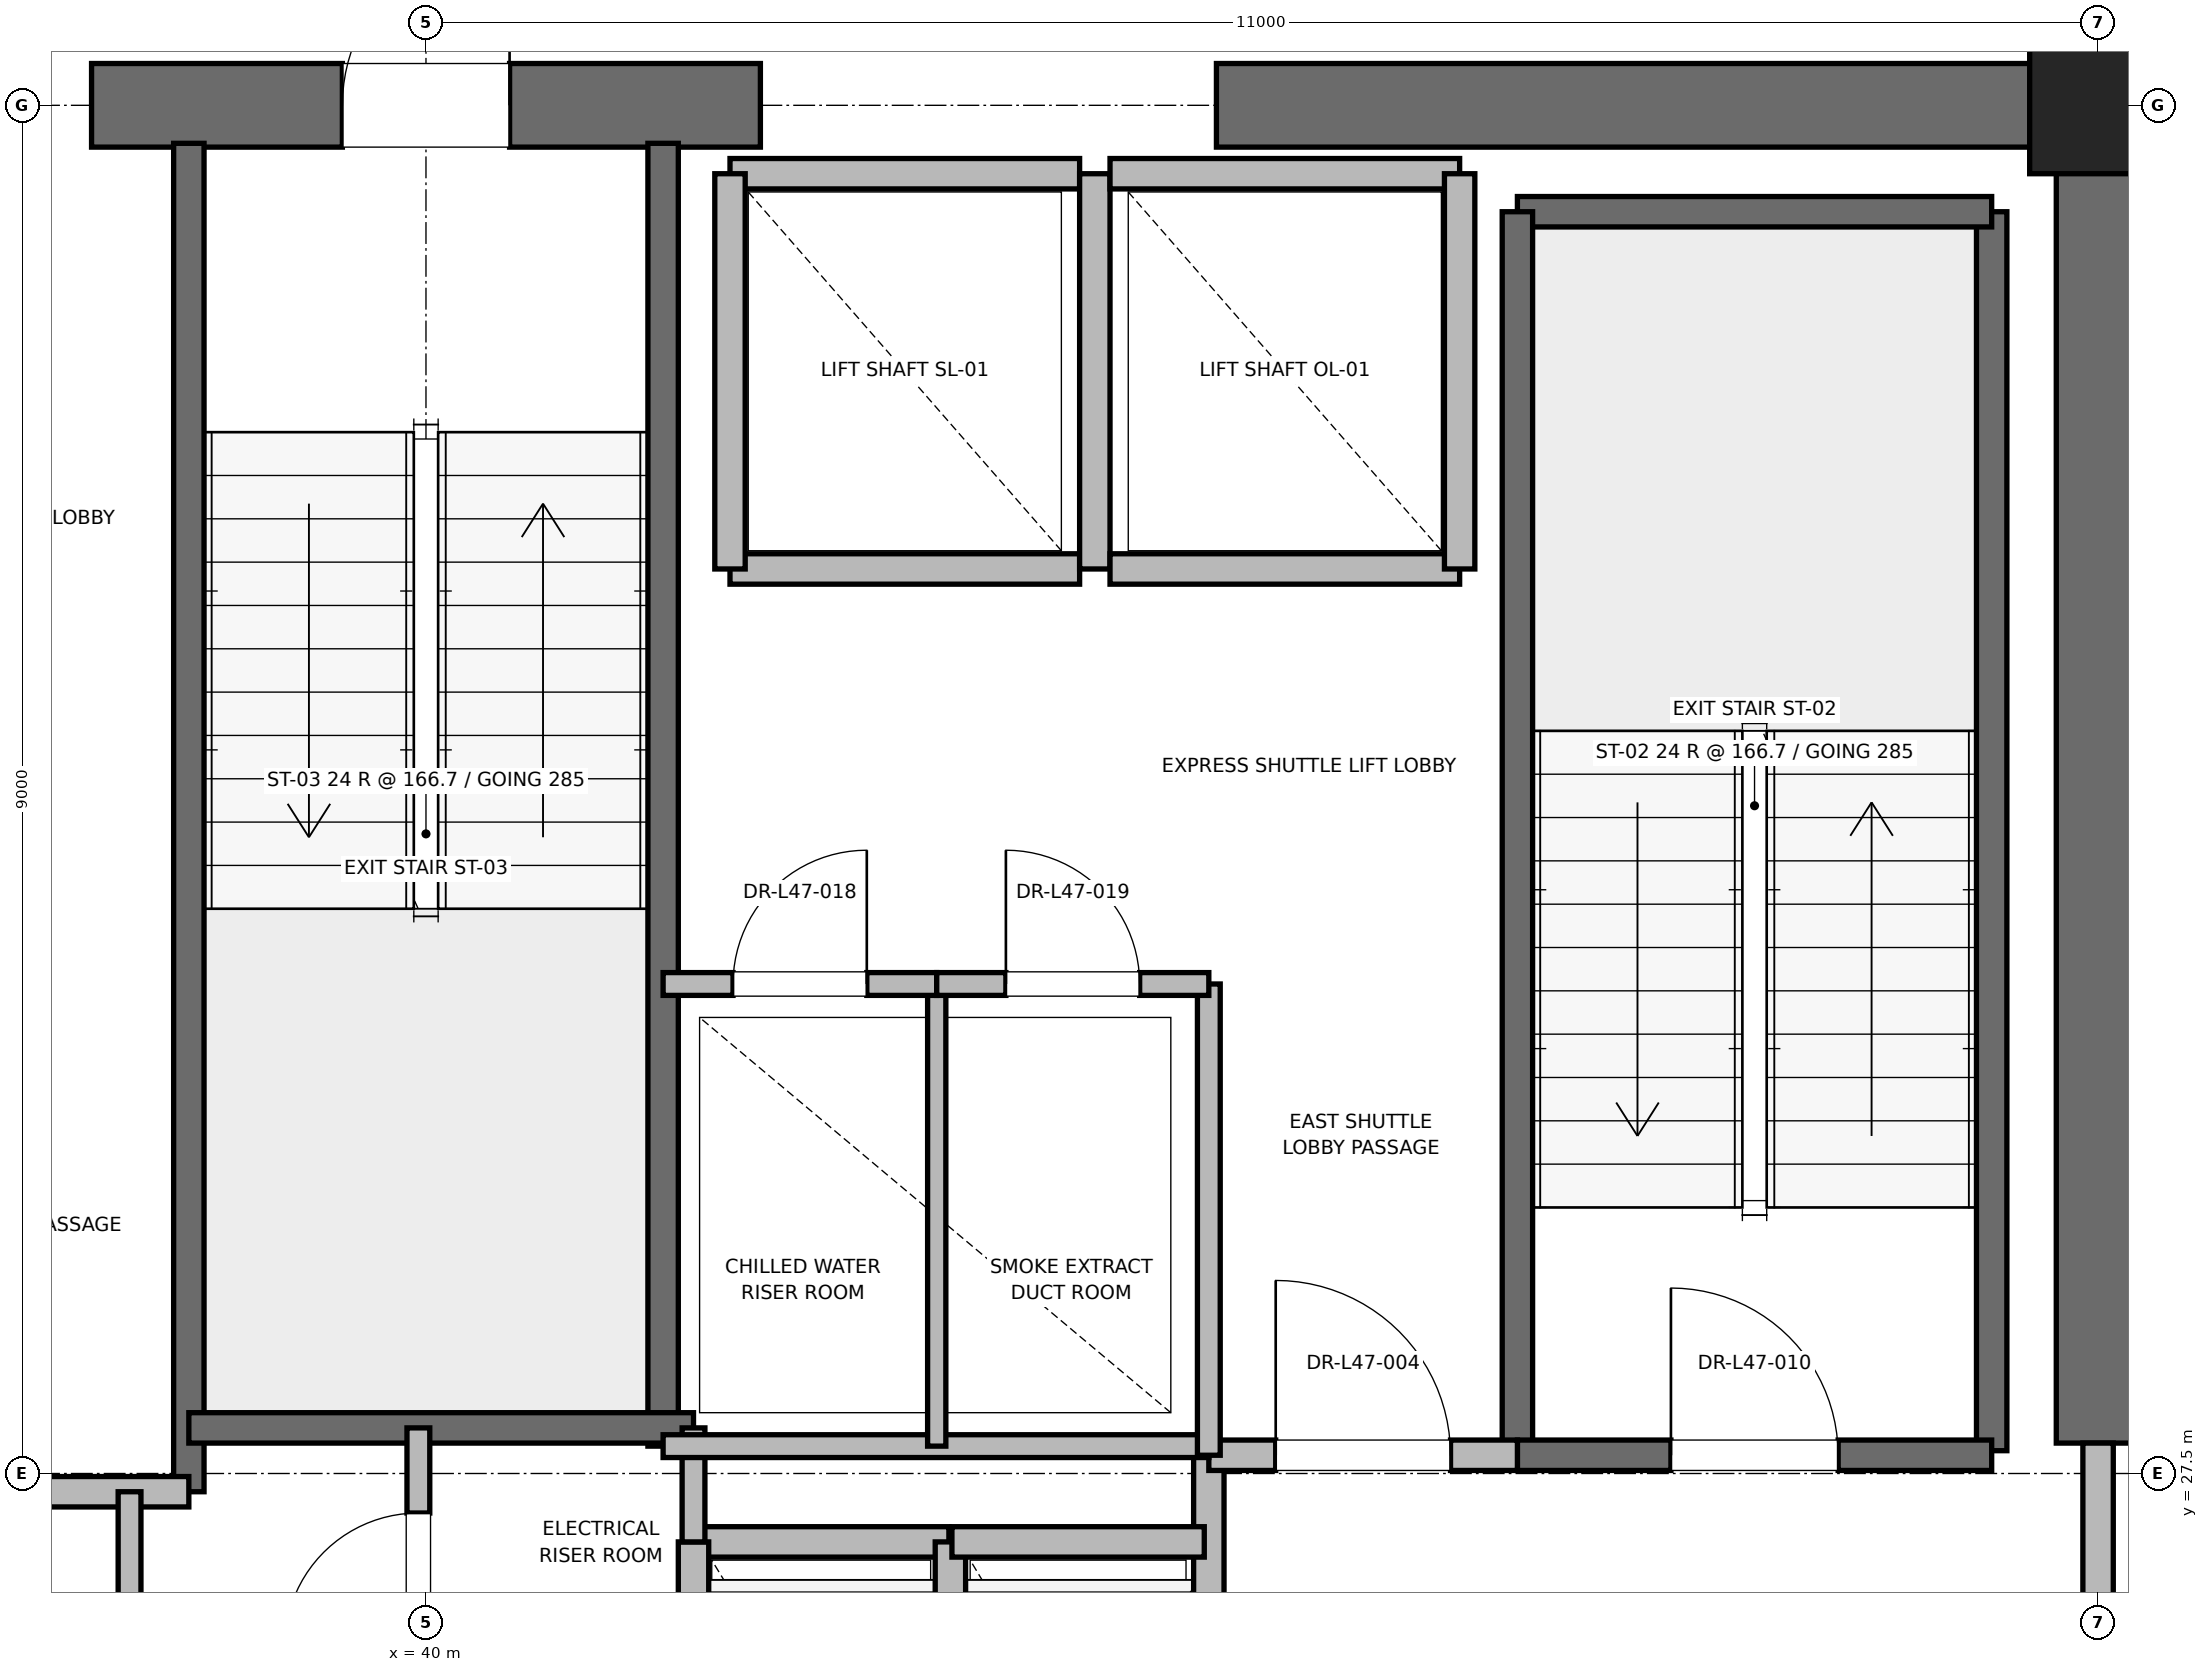
"""IFC4 building model, lengths in metres.
Left out: names, types, materials, properties, quantities, classifications, styles, units other than length and angle.
Written with IfcOpenShell. Run it as: python <this file> out.ifc"""

import sys

from ifc_helpers import new_model, si_unit, direction, frame, frame_2d, origin, origin_2d, place, context, subcontext, project, spatial, rectangle, extrude, element, fill, save


model = new_model("IFC4")
c1 = context("Model", 3, precision=1e-05, world=origin(), true_north=direction((0.0, 1.0)))
c2 = subcontext(c1, "Body", "Model", "MODEL_VIEW")
j1 = project(units=[si_unit("LENGTHUNIT", "METRE"), si_unit("PLANEANGLEUNIT", "RADIAN")], contexts=[c1])
p1 = place(None, origin())
s1 = spatial("IfcSite", under=j1, at=p1, CompositionType="ELEMENT")
p2 = place(p1, origin())
s2 = spatial("IfcBuilding", under=s1, at=p2, CompositionType="ELEMENT")
p3 = place(p2, frame((0.0, 0.0, 205.2)))
s3 = spatial("IfcBuildingStorey", under=s2, at=p3, CompositionType="ELEMENT", Elevation=205.2)
p4 = place(p3, frame((51.0, 36.5, 0.0), z_axis=(0.0, 0.0, 1.0), x_axis=(1.0, 0.0, 0.0)))
e1 = element("IfcColumn", 1, at=p4, inside=s3, PredefinedType="PILASTER", context=c2, shape_type="SweptSolid", body=[
    extrude(rectangle(XDim=0.9, YDim=0.9, at=origin_2d()), origin(), (0.0, 0.0, 1.0), 4.0),
])
p5 = place(p3, frame((37.8, 36.5, 0.0), z_axis=(0.0, 0.0, 1.0), x_axis=(1.0, 0.0, 0.0)))
e2 = element("IfcWall", 2, at=p5, inside=s3, PredefinedType="SHEAR", context=c2, shape_type="SweptSolid", body=[
    extrude(rectangle(XDim=4.4, YDim=0.55, at=frame_2d((2.2, 0.0))), origin(), (0.0, 0.0, 1.0), 3.775),
])
p6 = place(p5, frame((1.65, 0.0, 0.0)))
e3 = element("IfcOpeningElement", 3, at=p6, cuts=e2, PredefinedType="OPENING", context=c2, shape_type="SweptSolid", body=[
    extrude(rectangle(XDim=1.1, YDim=2.15, at=frame_2d((0.55, 1.075))), frame((0.0, 0.275, 0.0), z_axis=(0.0, -1.0, 0.0), x_axis=(1.0, 0.0, 0.0)), (0.0, 0.0, 1.0), 0.55),
])
p7 = place(p3, frame((45.2, 36.5, 0.0), z_axis=(0.0, 0.0, 1.0), x_axis=(1.0, 0.0, 0.0)))
e4 = element("IfcWall", 4, at=p7, inside=s3, PredefinedType="SHEAR", context=c2, shape_type="SweptSolid", body=[
    extrude(rectangle(XDim=5.8, YDim=0.55, at=frame_2d((2.9, 0.0))), origin(), (0.0, 0.0, 1.0), 3.775),
])
p8 = place(p3, frame((51.0, 27.7, 0.0), z_axis=(0.0, 0.0, 1.0), x_axis=(0.0, 1.0, 0.0)))
e5 = element("IfcWall", 5, at=p8, inside=s3, PredefinedType="SHEAR", context=c2, shape_type="SweptSolid", body=[
    extrude(rectangle(XDim=8.8, YDim=0.55, at=frame_2d((4.4, 0.0))), origin(), (0.0, 0.0, 1.0), 3.775),
])
p9 = place(p3, frame((50.3, 27.65, 0.0), z_axis=(0.0, 0.0, 1.0), x_axis=(0.0, 1.0, 0.0)))
e6 = element("IfcWall", 6, at=p9, inside=s3, PredefinedType="SOLIDWALL", context=c2, shape_type="SweptSolid", body=[
    extrude(rectangle(XDim=8.15, YDim=0.2, at=frame_2d((4.075, 0.0))), origin(), (0.0, 0.0, 1.0), 3.775),
])
p10 = place(p3, frame((47.18, 35.8, 0.0), z_axis=(0.0, 0.0, 1.0), x_axis=(1.0, 0.0, 0.0)))
e7 = element("IfcWall", 7, at=p10, inside=s3, PredefinedType="SOLIDWALL", context=c2, shape_type="SweptSolid", body=[
    extrude(rectangle(XDim=3.12, YDim=0.2, at=frame_2d((1.56, 0.0))), origin(), (0.0, 0.0, 1.0), 3.775),
])
p11 = place(p3, frame((47.18, 27.62, 0.0), z_axis=(0.0, 0.0, 1.0), x_axis=(0.0, 1.0, 0.0)))
e8 = element("IfcWall", 8, at=p11, inside=s3, PredefinedType="SOLIDWALL", context=c2, shape_type="SweptSolid", body=[
    extrude(rectangle(XDim=8.18, YDim=0.2, at=frame_2d((4.09, 0.0))), origin(), (0.0, 0.0, 1.0), 3.775),
])
p12 = place(p3, frame((47.18, 27.62, 0.0), z_axis=(0.0, 0.0, 1.0), x_axis=(1.0, 0.0, 0.0)))
e9 = element("IfcWall", 9, at=p12, inside=s3, PredefinedType="SOLIDWALL", context=c2, shape_type="SweptSolid", body=[
    extrude(rectangle(XDim=3.12, YDim=0.2, at=frame_2d((1.56, 0.0))), origin(), (0.0, 0.0, 1.0), 3.775),
])
p13 = place(p12, frame((1.01, 0.0, 0.0)))
e10 = element("IfcOpeningElement", 10, at=p13, cuts=e9, PredefinedType="OPENING", context=c2, shape_type="SweptSolid", body=[
    extrude(rectangle(XDim=1.1, YDim=2.15, at=frame_2d((0.55, 1.075))), frame((0.0, 0.1, 0.0), z_axis=(0.0, -1.0, 0.0), x_axis=(1.0, 0.0, 0.0)), (0.0, 0.0, 1.0), 0.2),
])
p14 = place(p3, frame((38.44, 27.38, 0.0), z_axis=(0.0, 0.0, 1.0), x_axis=(0.0, 1.0, 0.0)))
e11 = element("IfcWall", 11, at=p14, inside=s3, PredefinedType="SOLIDWALL", context=c2, shape_type="SweptSolid", body=[
    extrude(rectangle(XDim=8.87, YDim=0.2, at=frame_2d((4.435, 0.0))), origin(), (0.0, 0.0, 1.0), 3.775),
])
p15 = place(p3, frame((41.56, 27.68, 0.0), z_axis=(0.0, 0.0, 1.0), x_axis=(0.0, 1.0, 0.0)))
e12 = element("IfcWall", 12, at=p15, inside=s3, PredefinedType="SOLIDWALL", context=c2, shape_type="SweptSolid", body=[
    extrude(rectangle(XDim=8.57, YDim=0.2, at=frame_2d((4.285, 0.0))), origin(), (0.0, 0.0, 1.0), 3.775),
])
p16 = place(p3, frame((38.44, 27.8, 0.0), z_axis=(0.0, 0.0, 1.0), x_axis=(1.0, 0.0, 0.0)))
e13 = element("IfcWall", 13, at=p16, inside=s3, PredefinedType="SOLIDWALL", context=c2, shape_type="SweptSolid", body=[
    extrude(rectangle(XDim=3.32, YDim=0.2, at=frame_2d((1.66, 0.0))), origin(), (0.0, 0.0, 1.0), 3.775),
])
p17 = place(p3, frame((32.82, 27.38, 0.0), z_axis=(0.0, 0.0, 1.0), x_axis=(1.0, 0.0, 0.0)))
e14 = element("IfcWall", 14, at=p17, inside=s3, PredefinedType="PARTITIONING", context=c2, shape_type="SweptSolid", body=[
    extrude(rectangle(XDim=5.62, YDim=0.2, at=frame_2d((2.81, 0.0))), origin(), (0.0, 0.0, 1.0), 3.775),
])
p18 = place(p3, frame((45.15, 24.25, 0.0), z_axis=(0.0, 0.0, 1.0), x_axis=(0.0, 1.0, 0.0)))
e15 = element("IfcWall", 15, at=p18, inside=s3, PredefinedType="PARTITIONING", context=c2, shape_type="SweptSolid", body=[
    extrude(rectangle(XDim=3.37, YDim=0.2, at=frame_2d((1.685, 0.0))), origin(), (0.0, 0.0, 1.0), 3.775),
])
p19 = place(p3, frame((45.15, 27.62, 0.0), z_axis=(0.0, 0.0, 1.0), x_axis=(1.0, 0.0, 0.0)))
e16 = element("IfcWall", 16, at=p19, inside=s3, PredefinedType="PARTITIONING", context=c2, shape_type="SweptSolid", body=[
    extrude(rectangle(XDim=2.03, YDim=0.2, at=frame_2d((1.015, 0.0))), origin(), (0.0, 0.0, 1.0), 3.775),
])
p20 = place(p19, frame((0.44, 0.0, 0.0)))
e17 = element("IfcOpeningElement", 17, at=p20, cuts=e16, PredefinedType="OPENING", context=c2, shape_type="SweptSolid", body=[
    extrude(rectangle(XDim=1.15, YDim=2.2, at=frame_2d((0.575, 1.1))), frame((0.0, 0.1, 0.0), z_axis=(0.0, -1.0, 0.0), x_axis=(1.0, 0.0, 0.0)), (0.0, 0.0, 1.0), 0.2),
])
p21 = place(p3, frame((51.0, 24.3, 0.0), z_axis=(0.0, 0.0, 1.0), x_axis=(0.0, 1.0, 0.0)))
e18 = element("IfcWall", 18, at=p21, inside=s3, PredefinedType="PARTITIONING", context=c2, shape_type="SweptSolid", body=[
    extrude(rectangle(XDim=3.4, YDim=0.2, at=frame_2d((1.7, 0.0))), origin(), (0.0, 0.0, 1.0), 2.755),
])
p22 = place(p21, frame((1.125, 0.0, 0.0)))
e19 = element("IfcOpeningElement", 19, at=p22, cuts=e18, PredefinedType="OPENING", context=c2, shape_type="SweptSolid", body=[
    extrude(rectangle(XDim=1.15, YDim=2.2, at=frame_2d((0.575, 1.1))), frame((0.0, 0.1, 0.0), z_axis=(0.0, -1.0, 0.0), x_axis=(1.0, 0.0, 0.0)), (0.0, 0.0, 1.0), 0.2),
])
p23 = place(p3, frame((43.44, 27.05, 0.0), z_axis=(0.0, 0.0, 1.0), x_axis=(-1.0, 0.0, 0.0)))
e20 = element("IfcWall", 20, at=p23, inside=s3, PredefinedType="SOLIDWALL", context=c2, shape_type="SweptSolid", body=[
    extrude(rectangle(XDim=1.68, YDim=0.2, at=frame_2d((0.84, 0.0))), origin(), (0.0, 0.0, 1.0), 3.775),
])
for number, where, z_axis, x_axis in (
    (21, (41.76, 27.05, 0.0), (0.0, 0.0, 1.0), (0.0, -1.0, 0.0)),
    (22, (43.45, 24.45, 0.0), (0.0, 0.0, 1.0), (0.0, 1.0, 0.0)),
):
    element("IfcWall", number, at=place(p3, frame(where, z_axis=z_axis, x_axis=x_axis)), inside=s3, PredefinedType="SOLIDWALL", context=c2, shape_type="SweptSolid", body=[
        extrude(rectangle(XDim=2.6, YDim=0.2, at=frame_2d((1.3, 0.0))), origin(), (0.0, 0.0, 1.0), 3.775),
    ])
p24 = place(p3, frame((45.12, 27.05, 0.0), z_axis=(0.0, 0.0, 1.0), x_axis=(-1.0, 0.0, 0.0)))
e23 = element("IfcWall", 23, at=p24, inside=s3, PredefinedType="SOLIDWALL", context=c2, shape_type="SweptSolid", body=[
    extrude(rectangle(XDim=1.66, YDim=0.2, at=frame_2d((0.83, 0.0))), origin(), (0.0, 0.0, 1.0), 3.775),
])
p25 = place(p3, frame((42.0, 33.45, 0.0), z_axis=(0.0, 0.0, 1.0), x_axis=(1.0, 0.0, 0.0)))
e24 = element("IfcWall", 24, at=p25, inside=s3, PredefinedType="SOLIDWALL", context=c2, shape_type="SweptSolid", body=[
    extrude(rectangle(XDim=2.3, YDim=0.2, at=frame_2d((1.15, 0.0))), origin(), (0.0, 0.0, 1.0), 3.775),
])
p26 = place(p3, frame((44.3, 36.05, 0.0), z_axis=(0.0, 0.0, 1.0), x_axis=(-1.0, 0.0, 0.0)))
e25 = element("IfcWall", 25, at=p26, inside=s3, PredefinedType="SOLIDWALL", context=c2, shape_type="SweptSolid", body=[
    extrude(rectangle(XDim=2.3, YDim=0.2, at=frame_2d((1.15, 0.0))), origin(), (0.0, 0.0, 1.0), 2.755),
])
for number, where, z_axis, x_axis in (
    (26, (42.0, 36.05, 0.0), (0.0, 0.0, 1.0), (0.0, -1.0, 0.0)),
    (27, (44.4, 33.45, 0.0), (0.0, 0.0, 1.0), (0.0, 1.0, 0.0)),
):
    element("IfcWall", number, at=place(p3, frame(where, z_axis=z_axis, x_axis=x_axis)), inside=s3, PredefinedType="SOLIDWALL", context=c2, shape_type="SweptSolid", body=[
        extrude(rectangle(XDim=2.6, YDim=0.2, at=frame_2d((1.3, 0.0))), origin(), (0.0, 0.0, 1.0), 2.755),
    ])
p27 = place(p3, frame((44.5, 33.45, 0.0), z_axis=(0.0, 0.0, 1.0), x_axis=(1.0, 0.0, 0.0)))
e28 = element("IfcWall", 28, at=p27, inside=s3, PredefinedType="SOLIDWALL", context=c2, shape_type="SweptSolid", body=[
    extrude(rectangle(XDim=2.3, YDim=0.2, at=frame_2d((1.15, 0.0))), origin(), (0.0, 0.0, 1.0), 3.775),
])
p28 = place(p3, frame((46.8, 36.05, 0.0), z_axis=(0.0, 0.0, 1.0), x_axis=(-1.0, 0.0, 0.0)))
e29 = element("IfcWall", 29, at=p28, inside=s3, PredefinedType="SOLIDWALL", context=c2, shape_type="SweptSolid", body=[
    extrude(rectangle(XDim=2.3, YDim=0.2, at=frame_2d((1.15, 0.0))), origin(), (0.0, 0.0, 1.0), 2.755),
])
p29 = place(p3, frame((46.8, 33.45, 0.0), z_axis=(0.0, 0.0, 1.0), x_axis=(0.0, 1.0, 0.0)))
e30 = element("IfcWall", 30, at=p29, inside=s3, PredefinedType="SOLIDWALL", context=c2, shape_type="SweptSolid", body=[
    extrude(rectangle(XDim=2.6, YDim=0.2, at=frame_2d((1.3, 0.0))), origin(), (0.0, 0.0, 1.0), 3.775),
])
p30 = place(p3, frame((41.76, 27.05, 0.0), z_axis=(0.0, 0.0, 1.0), x_axis=(0.0, 1.0, 0.0)))
e31 = element("IfcWall", 31, at=p30, inside=s3, PredefinedType="PARTITIONING", context=c2, shape_type="SweptSolid", body=[
    extrude(rectangle(XDim=0.75, YDim=0.15, at=frame_2d((0.375, 0.0))), origin(), (0.0, 0.0, 1.0), 2.85),
])
p31 = place(p3, frame((39.95, 25.8, 0.0), z_axis=(0.0, 0.0, 1.0), x_axis=(0.0, 1.0, 0.0)))
e32 = element("IfcWall", 32, at=p31, inside=s3, PredefinedType="PARTITIONING", context=c2, shape_type="SweptSolid", body=[
    extrude(rectangle(XDim=2.0, YDim=0.15, at=frame_2d((1.0, 0.0))), origin(), (0.0, 0.0, 1.0), 2.85),
])
p32 = place(p31, frame((0.56, 0.0, 0.0)))
e33 = element("IfcOpeningElement", 33, at=p32, cuts=e32, PredefinedType="OPENING", context=c2, shape_type="SweptSolid", body=[
    extrude(rectangle(XDim=0.88, YDim=2.1, at=frame_2d((0.44, 1.05))), frame((0.0, 0.075, 0.0), z_axis=(0.0, -1.0, 0.0), x_axis=(1.0, 0.0, 0.0)), (0.0, 0.0, 1.0), 0.15),
])
p33 = place(p3, frame((38.05, 23.06, 0.0), z_axis=(0.0, 0.0, 1.0), x_axis=(0.0, 1.0, 0.0)))
e34 = element("IfcWall", 34, at=p33, inside=s3, PredefinedType="PARTITIONING", context=c2, shape_type="SweptSolid", body=[
    extrude(rectangle(XDim=4.32, YDim=0.15, at=frame_2d((2.16, 0.0))), origin(), (0.0, 0.0, 1.0), 2.85),
])
p34 = place(p33, frame((1.66, 0.0, 0.0)))
e35 = element("IfcOpeningElement", 35, at=p34, cuts=e34, PredefinedType="OPENING", context=c2, shape_type="SweptSolid", body=[
    extrude(rectangle(XDim=1.0, YDim=2.15, at=frame_2d((0.5, 1.075))), frame((0.0, 0.075, 0.0), z_axis=(0.0, -1.0, 0.0), x_axis=(1.0, 0.0, 0.0)), (0.0, 0.0, 1.0), 0.15),
])
p35 = place(p3, frame((41.56, 27.68, 0.0), z_axis=(0.0, 0.0, 1.0), x_axis=(1.0, 0.0, 0.0)))
e36 = element("IfcWall", 36, at=p35, inside=s3, PredefinedType="PARTITIONING", context=c2, shape_type="SweptSolid", body=[
    extrude(rectangle(XDim=3.59, YDim=0.15, at=frame_2d((1.795, 0.0))), origin(), (0.0, 0.0, 1.0), 2.85),
])
p36 = place(p3, frame((45.15, 27.62, 0.0), z_axis=(0.0, 0.0, 1.0), x_axis=(0.0, 1.0, 0.0)))
e37 = element("IfcWall", 37, at=p36, inside=s3, PredefinedType="PARTITIONING", context=c2, shape_type="SweptSolid", body=[
    extrude(rectangle(XDim=3.1, YDim=0.15, at=frame_2d((1.55, 0.0))), origin(), (0.0, 0.0, 1.0), 2.85),
])
p37 = place(p3, frame((43.36, 27.68, 0.0), z_axis=(0.0, 0.0, 1.0), x_axis=(0.0, 1.0, 0.0)))
e38 = element("IfcWall", 38, at=p37, inside=s3, PredefinedType="PARTITIONING", context=c2, shape_type="SweptSolid", body=[
    extrude(rectangle(XDim=3.04, YDim=0.12, at=frame_2d((1.52, 0.0))), origin(), (0.0, 0.0, 1.0), 2.85),
])
p38 = place(p3, frame((41.56, 30.72, 0.0), z_axis=(0.0, 0.0, 1.0), x_axis=(1.0, 0.0, 0.0)))
e39 = element("IfcWall", 39, at=p38, inside=s3, PredefinedType="PARTITIONING", context=c2, shape_type="SweptSolid", body=[
    extrude(rectangle(XDim=1.8, YDim=0.15, at=frame_2d((0.9, 0.0))), origin(), (0.0, 0.0, 1.0), 2.85),
])
p39 = place(p38, frame((0.46, 0.0, 0.0)))
e40 = element("IfcOpeningElement", 40, at=p39, cuts=e39, PredefinedType="OPENING", context=c2, shape_type="SweptSolid", body=[
    extrude(rectangle(XDim=0.88, YDim=2.1, at=frame_2d((0.44, 1.05))), frame((0.0, 0.075, 0.0), z_axis=(0.0, -1.0, 0.0), x_axis=(1.0, 0.0, 0.0)), (0.0, 0.0, 1.0), 0.15),
])
p40 = place(p3, frame((43.36, 30.72, 0.0), z_axis=(0.0, 0.0, 1.0), x_axis=(1.0, 0.0, 0.0)))
e41 = element("IfcWall", 41, at=p40, inside=s3, PredefinedType="PARTITIONING", context=c2, shape_type="SweptSolid", body=[
    extrude(rectangle(XDim=1.79, YDim=0.15, at=frame_2d((0.895, 0.0))), origin(), (0.0, 0.0, 1.0), 2.85),
])
p41 = place(p40, frame((0.455, 0.0, 0.0)))
e42 = element("IfcOpeningElement", 42, at=p41, cuts=e41, PredefinedType="OPENING", context=c2, shape_type="SweptSolid", body=[
    extrude(rectangle(XDim=0.88, YDim=2.1, at=frame_2d((0.44, 1.05))), frame((0.0, 0.075, 0.0), z_axis=(0.0, -1.0, 0.0), x_axis=(1.0, 0.0, 0.0)), (0.0, 0.0, 1.0), 0.15),
])
p42 = place(p13, origin())
e43 = element("IfcDoor", 43, at=p42, inside=s3, OperationType="SINGLE_SWING_LEFT", PredefinedType="DOOR", context=c2, shape_type="SweptSolid", body=[
    extrude(rectangle(XDim=1.1, YDim=2.15, at=frame_2d((0.55, 1.075))), frame((0.0, 0.025, 0.0), z_axis=(0.0, -1.0, 0.0), x_axis=(1.0, 0.0, 0.0)), (0.0, 0.0, 1.0), 0.05),
])
fill(e10, e43)
p43 = place(p6, origin())
e44 = element("IfcDoor", 44, at=p43, inside=s3, OperationType="SINGLE_SWING_RIGHT", PredefinedType="DOOR", context=c2, shape_type="SweptSolid", body=[
    extrude(rectangle(XDim=1.1, YDim=2.15, at=frame_2d((0.55, 1.075))), frame((0.0, 0.025, 0.0), z_axis=(0.0, -1.0, 0.0), x_axis=(1.0, 0.0, 0.0)), (0.0, 0.0, 1.0), 0.05),
])
fill(e3, e44)
p44 = place(p20, origin())
e45 = element("IfcDoor", 45, at=p44, inside=s3, OperationType="SINGLE_SWING_LEFT", PredefinedType="DOOR", context=c2, shape_type="SweptSolid", body=[
    extrude(rectangle(XDim=1.15, YDim=2.2, at=frame_2d((0.575, 1.1))), frame((0.0, 0.025, 0.0), z_axis=(0.0, -1.0, 0.0), x_axis=(1.0, 0.0, 0.0)), (0.0, 0.0, 1.0), 0.05),
])
fill(e17, e45)
p45 = place(p32, origin())
e46 = element("IfcDoor", 46, at=p45, inside=s3, OperationType="SINGLE_SWING_LEFT", PredefinedType="DOOR", context=c2, shape_type="SweptSolid", body=[
    extrude(rectangle(XDim=0.88, YDim=2.1, at=frame_2d((0.44, 1.05))), frame((0.0, 0.025, 0.0), z_axis=(0.0, -1.0, 0.0), x_axis=(1.0, 0.0, 0.0)), (0.0, 0.0, 1.0), 0.05),
])
fill(e33, e46)
p46 = place(p39, origin())
e47 = element("IfcDoor", 47, at=p46, inside=s3, OperationType="SINGLE_SWING_RIGHT", PredefinedType="DOOR", context=c2, shape_type="SweptSolid", body=[
    extrude(rectangle(XDim=0.88, YDim=2.1, at=frame_2d((0.44, 1.05))), frame((0.0, 0.025, 0.0), z_axis=(0.0, -1.0, 0.0), x_axis=(1.0, 0.0, 0.0)), (0.0, 0.0, 1.0), 0.05),
])
fill(e40, e47)
p47 = place(p41, origin())
e48 = element("IfcDoor", 48, at=p47, inside=s3, OperationType="SINGLE_SWING_LEFT", PredefinedType="DOOR", context=c2, shape_type="SweptSolid", body=[
    extrude(rectangle(XDim=0.88, YDim=2.1, at=frame_2d((0.44, 1.05))), frame((0.0, 0.025, 0.0), z_axis=(0.0, -1.0, 0.0), x_axis=(1.0, 0.0, 0.0)), (0.0, 0.0, 1.0), 0.05),
])
fill(e42, e48)
save(model, sys.argv[1])
